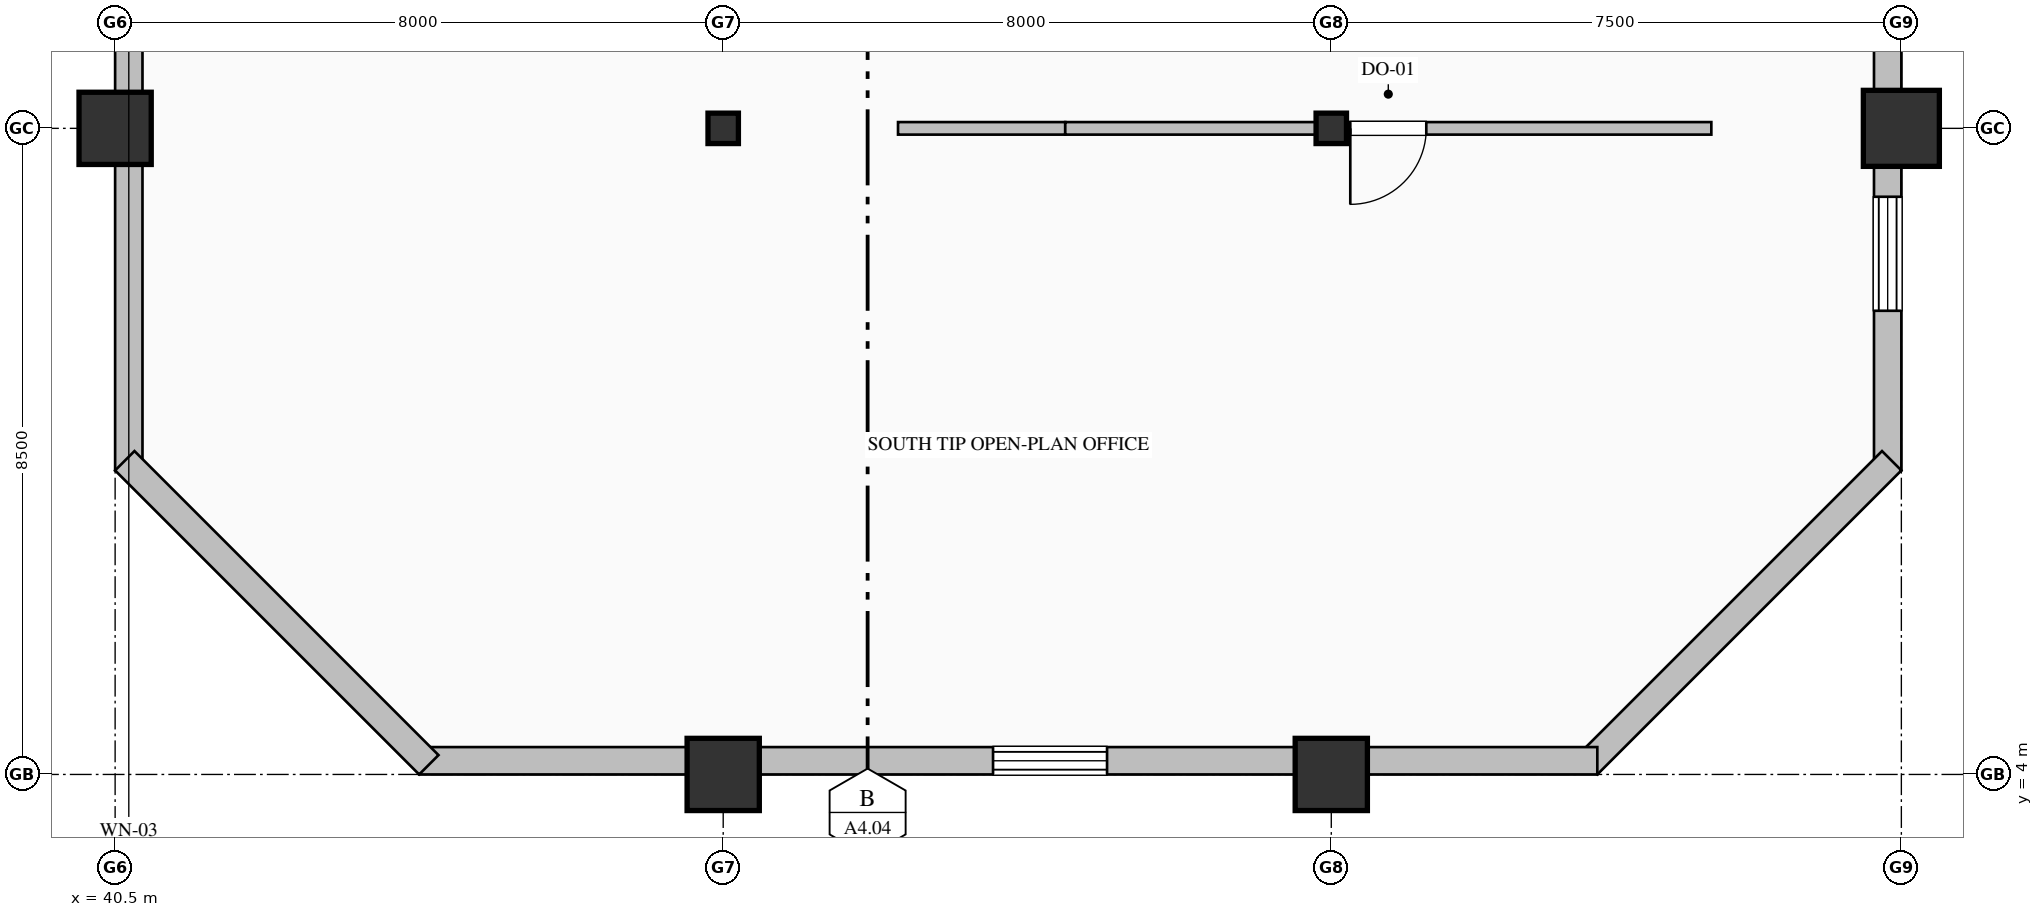
"""IFC4 building model, lengths in metres.
Left out: names, types, materials, properties, quantities, classifications, styles, units other than length and angle.
Written with IfcOpenShell. Run it as: python <this file> out.ifc"""

import sys

from ifc_helpers import new_model, si_unit, direction, frame, frame_2d, origin, origin_2d, place, context, subcontext, project, spatial, rectangle, hollow_rectangle, hollow_circle, i_section, extrude, element, fill, save


model = new_model("IFC4")
c1 = context("Model", 3, precision=1e-05, world=origin(), true_north=direction((0.0, 1.0)))
c2 = subcontext(c1, "Body", "Model", "MODEL_VIEW")
j1 = project(units=[si_unit("LENGTHUNIT", "METRE"), si_unit("PLANEANGLEUNIT", "RADIAN")], contexts=[c1])
p1 = place(None, origin())
s1 = spatial("IfcSite", under=j1, at=p1, CompositionType="ELEMENT")
p2 = place(p1, origin())
s2 = spatial("IfcBuilding", under=s1, at=p2, CompositionType="ELEMENT")
p3 = place(p2, frame((0.0, 0.0, 175.0)))
s3 = spatial("IfcBuildingStorey", under=s2, at=p3, CompositionType="ELEMENT", Elevation=175.0)
for number, where, z_axis, x_axis in (
    (1, (40.5, 12.5, 0.0), (0.0, 0.0, 1.0), (1.0, 0.0, 0.0)),
    (2, (48.5, 4.0, 0.0), (0.0, 0.0, 1.0), (1.0, 0.0, 0.0)),
):
    element("IfcColumn", number, at=place(p3, frame(where, z_axis=z_axis, x_axis=x_axis)), inside=s3, PredefinedType="COLUMN", context=c2, shape_type="SweptSolid", body=[
        extrude(hollow_rectangle(XDim=0.95, YDim=0.95, WallThickness=0.036, at=origin_2d()), origin(), (0.0, 0.0, 1.0), 4.0),
    ])
p4 = place(p3, frame((48.5, 12.5, 0.0), z_axis=(0.0, 0.0, 1.0), x_axis=(1.0, 0.0, 0.0)))
e3 = element("IfcColumn", 3, at=p4, inside=s3, PredefinedType="COLUMN", context=c2, shape_type="SweptSolid", body=[
    extrude(i_section(OverallWidth=0.4, OverallDepth=0.4, WebThickness=0.013, FlangeThickness=0.021, FilletRadius=0.022, at=origin_2d()), origin(), (0.0, 0.0, 1.0), 4.0),
])
p5 = place(p3, frame((56.5, 4.0, 0.0), z_axis=(0.0, 0.0, 1.0), x_axis=(1.0, 0.0, 0.0)))
e4 = element("IfcColumn", 4, at=p5, inside=s3, PredefinedType="COLUMN", context=c2, shape_type="SweptSolid", body=[
    extrude(hollow_rectangle(XDim=0.95, YDim=0.95, WallThickness=0.036, at=origin_2d()), origin(), (0.0, 0.0, 1.0), 4.0),
])
p6 = place(p3, frame((56.5, 12.5, 0.0), z_axis=(0.0, 0.0, 1.0), x_axis=(1.0, 0.0, 0.0)))
e5 = element("IfcColumn", 5, at=p6, inside=s3, PredefinedType="COLUMN", context=c2, shape_type="SweptSolid", body=[
    extrude(i_section(OverallWidth=0.4, OverallDepth=0.4, WebThickness=0.013, FlangeThickness=0.021, FilletRadius=0.022, at=origin_2d()), origin(), (0.0, 0.0, 1.0), 4.0),
])
p7 = place(p3, frame((64.0, 12.5, 0.0), z_axis=(0.0, 0.0, 1.0), x_axis=(1.0, 0.0, 0.0)))
e6 = element("IfcColumn", 6, at=p7, inside=s3, PredefinedType="COLUMN", context=c2, shape_type="SweptSolid", body=[
    extrude(hollow_circle(Radius=0.5, WallThickness=0.036, at=origin_2d()), origin(), (0.0, 0.0, 1.0), 4.0),
])
p8 = place(p3, frame((40.68, 8.0, 0.0), z_axis=(0.0, 0.0, 1.0), x_axis=(0.0, 1.0, 0.0)))
e7 = element("IfcWall", 7, at=p8, inside=s3, PredefinedType="SOLIDWALL", context=c2, shape_type="SweptSolid", body=[
    extrude(rectangle(XDim=20.36, YDim=0.36, at=frame_2d((10.18, 0.0))), origin(), (0.0, 0.0, 1.0), 3.165),
])
p9 = place(p8, frame((13.65, 0.0, 0.85)))
e8 = element("IfcOpeningElement", 8, at=p9, cuts=e7, PredefinedType="OPENING", context=c2, shape_type="SweptSolid", body=[
    extrude(rectangle(XDim=1.5, YDim=1.95, at=frame_2d((0.75, 0.975))), frame((0.0, 0.19, 0.0), z_axis=(0.0, -1.0, 0.0), x_axis=(1.0, 0.0, 0.0)), (0.0, 0.0, 1.0), 0.38),
])
p10 = place(p3, frame((63.82, 36.05, 0.0), z_axis=(0.0, 0.0, 1.0), x_axis=(0.0, -1.0, 0.0)))
e9 = element("IfcWall", 9, at=p10, inside=s3, PredefinedType="SOLIDWALL", context=c2, shape_type="SweptSolid", body=[
    extrude(rectangle(XDim=28.05, YDim=0.36, at=frame_2d((14.025, 0.0))), origin(), (0.0, 0.0, 1.0), 3.265),
])
p11 = place(p10, frame((2.85, 0.0, 0.85)))
e10 = element("IfcOpeningElement", 10, at=p11, cuts=e9, PredefinedType="OPENING", context=c2, shape_type="SweptSolid", body=[
    extrude(rectangle(XDim=1.5, YDim=1.95, at=frame_2d((0.75, 0.975))), frame((0.0, 0.19, 0.0), z_axis=(0.0, -1.0, 0.0), x_axis=(1.0, 0.0, 0.0)), (0.0, 0.0, 1.0), 0.38),
])
p12 = place(p10, frame((13.65, 0.0, 0.85)))
e11 = element("IfcOpeningElement", 11, at=p12, cuts=e9, PredefinedType="OPENING", context=c2, shape_type="SweptSolid", body=[
    extrude(rectangle(XDim=1.5, YDim=1.95, at=frame_2d((0.75, 0.975))), frame((0.0, 0.19, 0.0), z_axis=(0.0, -1.0, 0.0), x_axis=(1.0, 0.0, 0.0)), (0.0, 0.0, 1.0), 0.38),
])
p13 = place(p10, frame((24.45, 0.0, 0.85)))
e12 = element("IfcOpeningElement", 12, at=p13, cuts=e9, PredefinedType="OPENING", context=c2, shape_type="SweptSolid", body=[
    extrude(rectangle(XDim=1.5, YDim=1.95, at=frame_2d((0.75, 0.975))), frame((0.0, 0.19, 0.0), z_axis=(0.0, -1.0, 0.0), x_axis=(1.0, 0.0, 0.0)), (0.0, 0.0, 1.0), 0.38),
])
p14 = place(p3, frame((63.873, 8.127, 0.0), z_axis=(0.0, 0.0, 1.0), x_axis=(-0.707106781187, -0.707106781187, 0.0)))
e13 = element("IfcWall", 13, at=p14, inside=s3, PredefinedType="SOLIDWALL", context=c2, shape_type="SweptSolid", body=[
    extrude(rectangle(XDim=5.657, YDim=0.36, at=frame_2d((2.828, 0.0))), origin(), (0.0, 0.0, 1.0), 3.765),
])
p15 = place(p3, frame((60.0, 4.18, 0.0), z_axis=(0.0, 0.0, 1.0), x_axis=(-1.0, 0.0, 0.0)))
e14 = element("IfcWall", 14, at=p15, inside=s3, PredefinedType="SOLIDWALL", context=c2, shape_type="SweptSolid", body=[
    extrude(rectangle(XDim=15.5, YDim=0.36, at=frame_2d((7.75, 0.0))), origin(), (0.0, 0.0, 1.0), 3.265),
])
p16 = place(p15, frame((6.45, 0.0, 0.85)))
e15 = element("IfcOpeningElement", 15, at=p16, cuts=e14, PredefinedType="OPENING", context=c2, shape_type="SweptSolid", body=[
    extrude(rectangle(XDim=1.5, YDim=1.95, at=frame_2d((0.75, 0.975))), frame((0.0, 0.19, 0.0), z_axis=(0.0, -1.0, 0.0), x_axis=(1.0, 0.0, 0.0)), (0.0, 0.0, 1.0), 0.38),
])
p17 = place(p3, frame((44.627, 4.127, 0.0), z_axis=(0.0, 0.0, 1.0), x_axis=(-0.707106781187, 0.707106781187, 0.0)))
e16 = element("IfcWall", 16, at=p17, inside=s3, PredefinedType="SOLIDWALL", context=c2, shape_type="SweptSolid", body=[
    extrude(rectangle(XDim=5.657, YDim=0.36, at=frame_2d((2.828, 0.0))), origin(), (0.0, 0.0, 1.0), 3.765),
])
p18 = place(p3, frame((53.0, 12.5, 0.0), z_axis=(0.0, 0.0, 1.0), x_axis=(-1.0, 0.0, 0.0)))
e17 = element("IfcWall", 17, at=p18, inside=s3, PredefinedType="PARTITIONING", context=c2, shape_type="SweptSolid", body=[
    extrude(rectangle(XDim=2.2, YDim=0.165, at=frame_2d((1.1, 0.0))), origin(), (0.0, 0.0, 1.0), 3.157),
])
p19 = place(p3, frame((61.5, 12.5, 0.0), z_axis=(0.0, 0.0, 1.0), x_axis=(-1.0, 0.0, 0.0)))
e18 = element("IfcWall", 18, at=p19, inside=s3, PredefinedType="PARTITIONING", context=c2, shape_type="SweptSolid", body=[
    extrude(rectangle(XDim=8.5, YDim=0.165, at=frame_2d((4.25, 0.0))), origin(), (0.0, 0.0, 1.0), 3.157),
])
p20 = place(p19, frame((3.75, 0.0, 0.0)))
e19 = element("IfcOpeningElement", 19, at=p20, cuts=e18, PredefinedType="OPENING", context=c2, shape_type="SweptSolid", body=[
    extrude(rectangle(XDim=1.0, YDim=2.15, at=frame_2d((0.5, 1.075))), frame((0.0, 0.093, 0.0), z_axis=(0.0, -1.0, 0.0), x_axis=(1.0, 0.0, 0.0)), (0.0, 0.0, 1.0), 0.185),
])
p21 = place(p13, origin())
e20 = element("IfcWindow", 20, at=p21, inside=s3, PartitioningType="DOUBLE_PANEL_VERTICAL", PredefinedType="WINDOW", context=c2, shape_type="SweptSolid", body=[
    extrude(rectangle(XDim=1.5, YDim=1.95, at=frame_2d((0.75, 0.975))), frame((0.0, 0.15, 0.0), z_axis=(0.0, -1.0, 0.0), x_axis=(1.0, 0.0, 0.0)), (0.0, 0.0, 1.0), 0.06),
])
fill(e12, e20)
p22 = place(p16, origin())
e21 = element("IfcWindow", 21, at=p22, inside=s3, PartitioningType="DOUBLE_PANEL_VERTICAL", PredefinedType="WINDOW", context=c2, shape_type="SweptSolid", body=[
    extrude(rectangle(XDim=1.5, YDim=1.95, at=frame_2d((0.75, 0.975))), frame((0.0, 0.15, 0.0), z_axis=(0.0, -1.0, 0.0), x_axis=(1.0, 0.0, 0.0)), (0.0, 0.0, 1.0), 0.06),
])
fill(e15, e21)
p23 = place(p20, origin())
e22 = element("IfcDoor", 22, at=p23, inside=s3, OperationType="SINGLE_SWING_RIGHT", PredefinedType="DOOR", context=c2, shape_type="SweptSolid", body=[
    extrude(rectangle(XDim=1.0, YDim=2.15, at=frame_2d((0.5, 1.075))), frame((0.0, 0.025, 0.0), z_axis=(0.0, -1.0, 0.0), x_axis=(1.0, 0.0, 0.0)), (0.0, 0.0, 1.0), 0.05),
])
fill(e19, e22)
save(model, sys.argv[1])
